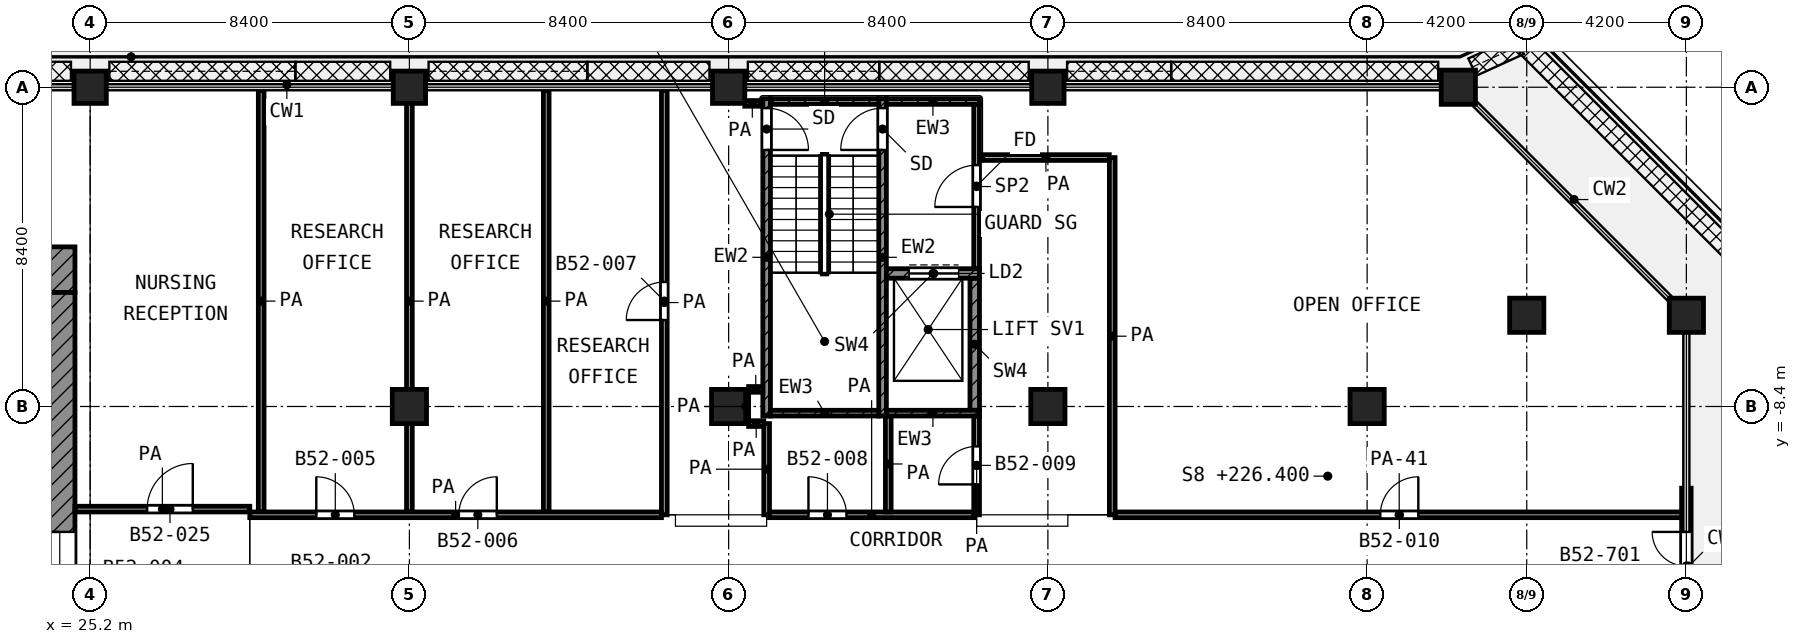
"""IFC4 building model, lengths in metres.
Left out: names, types, materials, properties, quantities, classifications, styles, units other than length and angle.
Written with IfcOpenShell. Run it as: python <this file> out.ifc"""

import sys

from ifc_helpers import new_model, si_unit, direction, frame, frame_2d, origin, origin_2d, place, context, subcontext, project, spatial, rectangle, extrude, element, fill, save


model = new_model("IFC4")
c1 = context("Model", 3, precision=1e-05, world=origin(), true_north=direction((0.0, 1.0)))
c2 = subcontext(c1, "Body", "Model", "MODEL_VIEW")
j1 = project(units=[si_unit("LENGTHUNIT", "METRE"), si_unit("PLANEANGLEUNIT", "RADIAN")], contexts=[c1])
p1 = place(None, origin())
s1 = spatial("IfcSite", under=j1, at=p1, CompositionType="ELEMENT")
p2 = place(p1, origin())
s2 = spatial("IfcBuilding", under=s1, at=p2, CompositionType="ELEMENT")
p3 = place(p2, frame((0.0, 0.0, 226.4)))
s3 = spatial("IfcBuildingStorey", under=s2, at=p3, CompositionType="ELEMENT", Elevation=226.4)
for number, where, z_axis, x_axis in (
    (1, (25.2, 0.0, 0.0), (0.0, 0.0, 1.0), (1.0, 0.0, 0.0)),
    (2, (33.6, 0.0, 0.0), (0.0, 0.0, 1.0), (1.0, 0.0, 0.0)),
    (3, (42.0, 0.0, 0.0), (0.0, 0.0, 1.0), (1.0, 0.0, 0.0)),
    (4, (50.4, 0.0, 0.0), (0.0, 0.0, 1.0), (1.0, 0.0, 0.0)),
):
    element("IfcColumn", number, at=place(p3, frame(where, z_axis=z_axis, x_axis=x_axis)), inside=s3, PredefinedType="COLUMN", context=c2, shape_type="SweptSolid", body=[
        extrude(rectangle(XDim=0.85, YDim=0.85, at=origin_2d()), origin(), (0.0, 0.0, 1.0), 4.2),
    ])
for number, where, z_axis, x_axis in (
    (5, (61.2, 0.0, 0.0), (0.0, 0.0, 1.0), (1.0, 0.0, 0.0)),
    (6, (63.0, -6.0, 0.0), (0.0, 0.0, 1.0), (1.0, 0.0, 0.0)),
    (7, (67.2, -6.0, 0.0), (0.0, 0.0, 1.0), (1.0, 0.0, 0.0)),
    (8, (33.6, -8.4, 0.0), (0.0, 0.0, 1.0), (1.0, 0.0, 0.0)),
    (9, (42.0, -8.4, 0.0), (0.0, 0.0, 1.0), (1.0, 0.0, 0.0)),
    (10, (50.4, -8.4, 0.0), (0.0, 0.0, 1.0), (1.0, 0.0, 0.0)),
    (11, (58.8, -8.4, 0.0), (0.0, 0.0, 1.0), (1.0, 0.0, 0.0)),
):
    element("IfcColumn", number, at=place(p3, frame(where, z_axis=z_axis, x_axis=x_axis)), inside=s3, PredefinedType="COLUMN", context=c2, shape_type="SweptSolid", body=[
        extrude(rectangle(XDim=0.9, YDim=0.9, at=origin_2d()), origin(), (0.0, 0.0, 1.0), 4.2),
    ])
p4 = place(p3, frame((67.2, -14.65, 0.0), z_axis=(0.0, 0.0, 1.0), x_axis=(0.0, 1.0, 0.0)))
e12 = element("IfcWall", 12, at=p4, inside=s3, PredefinedType="SOLIDWALL", context=c2, shape_type="SweptSolid", body=[
    extrude(rectangle(XDim=4.1, YDim=0.25, at=frame_2d((2.05, 0.0))), origin(), (0.0, 0.0, 1.0), 3.48),
])
p5 = place(p4, frame((1.15, 0.0, 0.0)))
e13 = element("IfcOpeningElement", 13, at=p5, cuts=e12, PredefinedType="OPENING", context=c2, shape_type="SweptSolid", body=[
    extrude(rectangle(XDim=1.8, YDim=2.1, at=frame_2d((0.9, 1.05))), frame((0.0, 0.135, 0.0), z_axis=(0.0, -1.0, 0.0), x_axis=(1.0, 0.0, 0.0)), (0.0, 0.0, 1.0), 0.27),
])
p6 = place(p3, frame((4.2, -4.8, 0.0), z_axis=(0.0, 0.0, 1.0), x_axis=(1.0, 0.0, 0.0)))
e14 = element("IfcWall", 14, at=p6, inside=s3, PredefinedType="SHEAR", context=c2, shape_type="SweptSolid", body=[
    extrude(rectangle(XDim=20.6, YDim=1.2, at=frame_2d((10.3, 0.0))), origin(), (0.0, 0.0, 1.0), 3.6),
])
p7 = place(p6, frame((1.95, 0.0, 0.0)))
e15 = element("IfcOpeningElement", 15, at=p7, cuts=e14, PredefinedType="OPENING", context=c2, shape_type="SweptSolid", body=[
    extrude(rectangle(XDim=1.1, YDim=2.1, at=frame_2d((0.55, 1.05))), frame((0.0, 0.61, 0.0), z_axis=(0.0, -1.0, 0.0), x_axis=(1.0, 0.0, 0.0)), (0.0, 0.0, 1.0), 1.22),
])
p8 = place(p6, frame((17.95, 0.0, 0.0)))
e16 = element("IfcOpeningElement", 16, at=p8, cuts=e14, PredefinedType="OPENING", context=c2, shape_type="SweptSolid", body=[
    extrude(rectangle(XDim=1.1, YDim=2.1, at=frame_2d((0.55, 1.05))), frame((0.0, 0.61, 0.0), z_axis=(0.0, -1.0, 0.0), x_axis=(1.0, 0.0, 0.0)), (0.0, 0.0, 1.0), 1.22),
])
p9 = place(p3, frame((24.4, -24.0, 0.0), z_axis=(0.0, 0.0, 1.0), x_axis=(0.0, 1.0, 0.0)))
e17 = element("IfcWall", 17, at=p9, inside=s3, PredefinedType="SHEAR", context=c2, shape_type="SweptSolid", body=[
    extrude(rectangle(XDim=18.6, YDim=0.8, at=frame_2d((9.3, 0.0))), origin(), (0.0, 0.0, 1.0), 3.6),
])
p10 = place(p9, frame((10.5, 0.0, 0.0)))
e18 = element("IfcOpeningElement", 18, at=p10, cuts=e17, PredefinedType="OPENING", context=c2, shape_type="SweptSolid", body=[
    extrude(rectangle(XDim=1.8, YDim=2.1, at=frame_2d((0.9, 1.05))), frame((0.0, 0.41, 0.0), z_axis=(0.0, -1.0, 0.0), x_axis=(1.0, 0.0, 0.0)), (0.0, 0.0, 1.0), 0.82),
])
p11 = place(p3, frame((43.0, -8.65, 0.0), z_axis=(0.0, 0.0, 1.0), x_axis=(0.0, 1.0, 0.0)))
e19 = element("IfcWall", 19, at=p11, inside=s3, PredefinedType="SHEAR", context=c2, shape_type="SweptSolid", body=[
    extrude(rectangle(XDim=8.35, YDim=0.2, at=frame_2d((4.175, 0.0))), origin(), (0.0, 0.0, 1.0), 3.6),
])
p12 = place(p11, frame((7.0, 0.0, 0.0)))
e20 = element("IfcOpeningElement", 20, at=p12, cuts=e19, PredefinedType="OPENING", context=c2, shape_type="SweptSolid", body=[
    extrude(rectangle(XDim=1.1, YDim=2.1, at=frame_2d((0.55, 1.05))), frame((0.0, 0.11, 0.0), z_axis=(0.0, -1.0, 0.0), x_axis=(1.0, 0.0, 0.0)), (0.0, 0.0, 1.0), 0.22),
])
p13 = place(p3, frame((46.05, -8.65, 0.0), z_axis=(0.0, 0.0, 1.0), x_axis=(0.0, 1.0, 0.0)))
e21 = element("IfcWall", 21, at=p13, inside=s3, PredefinedType="SHEAR", context=c2, shape_type="SweptSolid", body=[
    extrude(rectangle(XDim=8.35, YDim=0.2, at=frame_2d((4.175, 0.0))), origin(), (0.0, 0.0, 1.0), 3.6),
])
p14 = place(p13, frame((7.0, 0.0, 0.0)))
e22 = element("IfcOpeningElement", 22, at=p14, cuts=e21, PredefinedType="OPENING", context=c2, shape_type="SweptSolid", body=[
    extrude(rectangle(XDim=1.1, YDim=2.1, at=frame_2d((0.55, 1.05))), frame((0.0, 0.11, 0.0), z_axis=(0.0, -1.0, 0.0), x_axis=(1.0, 0.0, 0.0)), (0.0, 0.0, 1.0), 0.22),
])
p15 = place(p3, frame((43.1, -0.375, 0.0), z_axis=(0.0, 0.0, 1.0), x_axis=(1.0, 0.0, 0.0)))
e23 = element("IfcWall", 23, at=p15, inside=s3, PredefinedType="SHEAR", context=c2, shape_type="SweptSolid", body=[
    extrude(rectangle(XDim=2.85, YDim=0.15, at=frame_2d((1.425, 0.0))), origin(), (0.0, 0.0, 1.0), 3.6),
])
p16 = place(p3, frame((46.15, -0.375, 0.0), z_axis=(0.0, 0.0, 1.0), x_axis=(1.0, 0.0, 0.0)))
e24 = element("IfcWall", 24, at=p16, inside=s3, PredefinedType="SHEAR", context=c2, shape_type="SweptSolid", body=[
    extrude(rectangle(XDim=2.45, YDim=0.15, at=frame_2d((1.225, 0.0))), origin(), (0.0, 0.0, 1.0), 3.6),
])
p17 = place(p3, frame((43.1, -8.575, 0.0), z_axis=(0.0, 0.0, 1.0), x_axis=(1.0, 0.0, 0.0)))
e25 = element("IfcWall", 25, at=p17, inside=s3, PredefinedType="SHEAR", context=c2, shape_type="SweptSolid", body=[
    extrude(rectangle(XDim=2.85, YDim=0.15, at=frame_2d((1.425, 0.0))), origin(), (0.0, 0.0, 1.0), 3.6),
])
p18 = place(p3, frame((46.15, -8.575, 0.0), z_axis=(0.0, 0.0, 1.0), x_axis=(1.0, 0.0, 0.0)))
e26 = element("IfcWall", 26, at=p18, inside=s3, PredefinedType="SHEAR", context=c2, shape_type="SweptSolid", body=[
    extrude(rectangle(XDim=2.45, YDim=0.15, at=frame_2d((1.225, 0.0))), origin(), (0.0, 0.0, 1.0), 3.6),
])
p19 = place(p3, frame((46.15, -4.9, 0.0), z_axis=(0.0, 0.0, 1.0), x_axis=(1.0, 0.0, 0.0)))
e27 = element("IfcWall", 27, at=p19, inside=s3, PredefinedType="SHEAR", context=c2, shape_type="SweptSolid", body=[
    extrude(rectangle(XDim=2.45, YDim=0.25, at=frame_2d((1.225, 0.0))), origin(), (0.0, 0.0, 1.0), 3.6),
])
p20 = place(p19, frame((0.6, 0.0, 0.0)))
e28 = element("IfcOpeningElement", 28, at=p20, cuts=e27, PredefinedType="OPENING", context=c2, shape_type="SweptSolid", body=[
    extrude(rectangle(XDim=1.3, YDim=2.1, at=frame_2d((0.65, 1.05))), frame((0.0, 0.135, 0.0), z_axis=(0.0, -1.0, 0.0), x_axis=(1.0, 0.0, 0.0)), (0.0, 0.0, 1.0), 0.27),
])
p21 = place(p3, frame((48.475, -8.5, 0.0), z_axis=(0.0, 0.0, 1.0), x_axis=(0.0, 1.0, 0.0)))
e29 = element("IfcWall", 29, at=p21, inside=s3, PredefinedType="SHEAR", context=c2, shape_type="SweptSolid", body=[
    extrude(rectangle(XDim=3.475, YDim=0.25, at=frame_2d((1.738, 0.0))), origin(), (0.0, 0.0, 1.0), 3.6),
])
p22 = place(p3, frame((48.525, -4.775, 0.0), z_axis=(0.0, 0.0, 1.0), x_axis=(0.0, 1.0, 0.0)))
e30 = element("IfcWall", 30, at=p22, inside=s3, PredefinedType="PARTITIONING", context=c2, shape_type="SweptSolid", body=[
    extrude(rectangle(XDim=4.325, YDim=0.15, at=frame_2d((2.163, 0.0))), origin(), (0.0, 0.0, 1.0), 3.6),
])
p23 = place(p22, frame((1.625, 0.0, 0.0)))
e31 = element("IfcOpeningElement", 31, at=p23, cuts=e30, PredefinedType="OPENING", context=c2, shape_type="SweptSolid", body=[
    extrude(rectangle(XDim=1.1, YDim=2.1, at=frame_2d((0.55, 1.05))), frame((0.0, 0.085, 0.0), z_axis=(0.0, -1.0, 0.0), x_axis=(1.0, 0.0, 0.0)), (0.0, 0.0, 1.0), 0.17),
])
p24 = place(p3, frame((29.4, -11.25, 0.0), z_axis=(0.0, 0.0, 1.0), x_axis=(1.0, 0.0, 0.0)))
e32 = element("IfcWall", 32, at=p24, inside=s3, PredefinedType="PARTITIONING", context=c2, shape_type="SweptSolid", body=[
    extrude(rectangle(XDim=10.832, YDim=0.15, at=frame_2d((5.416, 0.0))), origin(), (0.0, 0.0, 1.0), 3.6),
])
p25 = place(p24, frame((1.75, 0.0, 0.0)))
e33 = element("IfcOpeningElement", 33, at=p25, cuts=e32, PredefinedType="OPENING", context=c2, shape_type="SweptSolid", body=[
    extrude(rectangle(XDim=1.0, YDim=2.1, at=frame_2d((0.5, 1.05))), frame((0.0, 0.085, 0.0), z_axis=(0.0, -1.0, 0.0), x_axis=(1.0, 0.0, 0.0)), (0.0, 0.0, 1.0), 0.17),
])
p26 = place(p24, frame((5.5, 0.0, 0.0)))
e34 = element("IfcOpeningElement", 34, at=p26, cuts=e32, PredefinedType="OPENING", context=c2, shape_type="SweptSolid", body=[
    extrude(rectangle(XDim=1.0, YDim=2.1, at=frame_2d((0.5, 1.05))), frame((0.0, 0.085, 0.0), z_axis=(0.0, -1.0, 0.0), x_axis=(1.0, 0.0, 0.0)), (0.0, 0.0, 1.0), 0.17),
])
p27 = place(p3, frame((43.075, -11.25, 0.0), z_axis=(0.0, 0.0, 1.0), x_axis=(1.0, 0.0, 0.0)))
e35 = element("IfcWall", 35, at=p27, inside=s3, PredefinedType="PARTITIONING", context=c2, shape_type="SweptSolid", body=[
    extrude(rectangle(XDim=5.375, YDim=0.15, at=frame_2d((2.688, 0.0))), origin(), (0.0, 0.0, 1.0), 3.6),
])
p28 = place(p27, frame((1.025, 0.0, 0.0)))
e36 = element("IfcOpeningElement", 36, at=p28, cuts=e35, PredefinedType="OPENING", context=c2, shape_type="SweptSolid", body=[
    extrude(rectangle(XDim=1.0, YDim=2.1, at=frame_2d((0.5, 1.05))), frame((0.0, 0.085, 0.0), z_axis=(0.0, -1.0, 0.0), x_axis=(1.0, 0.0, 0.0)), (0.0, 0.0, 1.0), 0.17),
])
p29 = place(p3, frame((52.168, -11.25, 0.0), z_axis=(0.0, 0.0, 1.0), x_axis=(1.0, 0.0, 0.0)))
e37 = element("IfcWall", 37, at=p29, inside=s3, PredefinedType="PARTITIONING", context=c2, shape_type="SweptSolid", body=[
    extrude(rectangle(XDim=14.952, YDim=0.15, at=frame_2d((7.476, 0.0))), origin(), (0.0, 0.0, 1.0), 2.7),
])
p30 = place(p29, frame((6.979, 0.0, 0.0)))
e38 = element("IfcOpeningElement", 38, at=p30, cuts=e37, PredefinedType="OPENING", context=c2, shape_type="SweptSolid", body=[
    extrude(rectangle(XDim=1.0, YDim=2.1, at=frame_2d((0.5, 1.05))), frame((0.0, 0.085, 0.0), z_axis=(0.0, -1.0, 0.0), x_axis=(1.0, 0.0, 0.0)), (0.0, 0.0, 1.0), 0.17),
])
p31 = place(p3, frame((24.8, -11.1, 0.0), z_axis=(0.0, 0.0, 1.0), x_axis=(1.0, 0.0, 0.0)))
e39 = element("IfcWall", 39, at=p31, inside=s3, PredefinedType="PARTITIONING", context=c2, shape_type="SweptSolid", body=[
    extrude(rectangle(XDim=4.6, YDim=0.15, at=frame_2d((2.3, 0.0))), origin(), (0.0, 0.0, 1.0), 3.6),
])
p32 = place(p31, frame((1.9, 0.0, 0.0)))
e40 = element("IfcOpeningElement", 40, at=p32, cuts=e39, PredefinedType="OPENING", context=c2, shape_type="SweptSolid", body=[
    extrude(rectangle(XDim=1.2, YDim=2.1, at=frame_2d((0.6, 1.05))), frame((0.0, 0.085, 0.0), z_axis=(0.0, -1.0, 0.0), x_axis=(1.0, 0.0, 0.0)), (0.0, 0.0, 1.0), 0.17),
])
p33 = place(p3, frame((42.525, -8.85, 0.0), z_axis=(0.0, 0.0, 1.0), x_axis=(1.0, 0.0, 0.0)))
e41 = element("IfcWall", 41, at=p33, inside=s3, PredefinedType="PARTITIONING", context=c2, shape_type="SweptSolid", body=[
    extrude(rectangle(XDim=0.4, YDim=0.15, at=frame_2d((0.2, 0.0))), origin(), (0.0, 0.0, 1.0), 3.6),
])
p34 = place(p3, frame((42.526, -7.95, 0.0), z_axis=(0.0, 0.0, 1.0), x_axis=(1.0, 0.0, 0.0)))
e42 = element("IfcWall", 42, at=p34, inside=s3, PredefinedType="PARTITIONING", context=c2, shape_type="SweptSolid", body=[
    extrude(rectangle(XDim=0.374, YDim=0.15, at=frame_2d((0.187, 0.0))), origin(), (0.0, 0.0, 1.0), 3.6),
])
p35 = place(p3, frame((48.68, -1.85, 0.0), z_axis=(0.0, 0.0, 1.0), x_axis=(1.0, 0.0, 0.0)))
e43 = element("IfcWall", 43, at=p35, inside=s3, PredefinedType="PARTITIONING", context=c2, shape_type="SweptSolid", body=[
    extrude(rectangle(XDim=3.336, YDim=0.15, at=frame_2d((1.668, 0.0))), origin(), (0.0, 0.0, 1.0), 3.6),
])
p36 = place(p3, frame((42.425, -0.425, 0.0), z_axis=(0.0, 0.0, 1.0), x_axis=(1.0, 0.0, 0.0)))
e44 = element("IfcWall", 44, at=p36, inside=s3, PredefinedType="PARTITIONING", context=c2, shape_type="SweptSolid", body=[
    extrude(rectangle(XDim=0.395, YDim=0.15, at=frame_2d((0.198, 0.0))), origin(), (0.0, 0.0, 1.0), 3.6),
])
for number, where, z_axis, x_axis in (
    (45, (29.7, -11.175, 0.0), (0.0, 0.0, 1.0), (0.0, 1.0, 0.0)),
    (46, (33.6, -11.175, 0.0), (0.0, 0.0, 1.0), (0.0, 1.0, 0.0)),
    (47, (37.2, -11.175, 0.0), (0.0, 0.0, 1.0), (0.0, 1.0, 0.0)),
):
    element("IfcWall", number, at=place(p3, frame(where, z_axis=z_axis, x_axis=x_axis)), inside=s3, PredefinedType="PARTITIONING", context=c2, shape_type="SweptSolid", body=[
        extrude(rectangle(XDim=11.095, YDim=0.15, at=frame_2d((5.547, 0.0))), origin(), (0.0, 0.0, 1.0), 3.6),
    ])
p37 = place(p3, frame((40.307, -11.25, 0.0), z_axis=(0.0, 0.0, 1.0), x_axis=(0.0, 1.0, 0.0)))
e48 = element("IfcWall", 48, at=p37, inside=s3, PredefinedType="PARTITIONING", context=c2, shape_type="SweptSolid", body=[
    extrude(rectangle(XDim=11.17, YDim=0.15, at=frame_2d((5.585, 0.0))), origin(), (0.0, 0.0, 1.0), 3.6),
])
p38 = place(p37, frame((5.125, 0.0, 0.0)))
e49 = element("IfcOpeningElement", 49, at=p38, cuts=e48, PredefinedType="OPENING", context=c2, shape_type="SweptSolid", body=[
    extrude(rectangle(XDim=1.0, YDim=2.1, at=frame_2d((0.5, 1.05))), frame((0.0, 0.085, 0.0), z_axis=(0.0, -1.0, 0.0), x_axis=(1.0, 0.0, 0.0)), (0.0, 0.0, 1.0), 0.17),
])
p39 = place(p3, frame((42.45, -8.85, 0.0), z_axis=(0.0, 0.0, 1.0), x_axis=(0.0, 1.0, 0.0)))
e50 = element("IfcWall", 50, at=p39, inside=s3, PredefinedType="PARTITIONING", context=c2, shape_type="SweptSolid", body=[
    extrude(rectangle(XDim=0.899, YDim=0.15, at=frame_2d((0.45, 0.0))), origin(), (0.0, 0.0, 1.0), 3.6),
])
p40 = place(p3, frame((43.0, -11.25, 0.0), z_axis=(0.0, 0.0, 1.0), x_axis=(0.0, 1.0, 0.0)))
e51 = element("IfcWall", 51, at=p40, inside=s3, PredefinedType="PARTITIONING", context=c2, shape_type="SweptSolid", body=[
    extrude(rectangle(XDim=2.4, YDim=0.15, at=frame_2d((1.2, 0.0))), origin(), (0.0, 0.0, 1.0), 3.6),
])
p41 = place(p3, frame((46.2, -11.175, 0.0), z_axis=(0.0, 0.0, 1.0), x_axis=(0.0, 1.0, 0.0)))
e52 = element("IfcWall", 52, at=p41, inside=s3, PredefinedType="PARTITIONING", context=c2, shape_type="SweptSolid", body=[
    extrude(rectangle(XDim=2.525, YDim=0.15, at=frame_2d((1.263, 0.0))), origin(), (0.0, 0.0, 1.0), 3.6),
])
p42 = place(p3, frame((48.525, -11.25, 0.0), z_axis=(0.0, 0.0, 1.0), x_axis=(0.0, 1.0, 0.0)))
e53 = element("IfcWall", 53, at=p42, inside=s3, PredefinedType="PARTITIONING", context=c2, shape_type="SweptSolid", body=[
    extrude(rectangle(XDim=2.6, YDim=0.15, at=frame_2d((1.3, 0.0))), origin(), (0.0, 0.0, 1.0), 3.6),
])
p43 = place(p42, frame((0.8, 0.0, 0.0)))
e54 = element("IfcOpeningElement", 54, at=p43, cuts=e53, PredefinedType="OPENING", context=c2, shape_type="SweptSolid", body=[
    extrude(rectangle(XDim=1.0, YDim=2.1, at=frame_2d((0.5, 1.05))), frame((0.0, 0.085, 0.0), z_axis=(0.0, -1.0, 0.0), x_axis=(1.0, 0.0, 0.0)), (0.0, 0.0, 1.0), 0.17),
])
p44 = place(p3, frame((52.093, -11.25, 0.0), z_axis=(0.0, 0.0, 1.0), x_axis=(0.0, 1.0, 0.0)))
e55 = element("IfcWall", 55, at=p44, inside=s3, PredefinedType="PARTITIONING", context=c2, shape_type="SweptSolid", body=[
    extrude(rectangle(XDim=9.399, YDim=0.15, at=frame_2d((4.699, 0.0))), origin(), (0.0, 0.0, 1.0), 3.6),
])
p45 = place(p5, origin())
e56 = element("IfcDoor", 56, at=p45, inside=s3, OperationType="DOUBLE_DOOR_SINGLE_SWING", PredefinedType="DOOR", context=c2, shape_type="SweptSolid", body=[
    extrude(rectangle(XDim=1.8, YDim=2.1, at=frame_2d((0.9, 1.05))), frame((0.0, 0.025, 0.0), z_axis=(0.0, -1.0, 0.0), x_axis=(1.0, 0.0, 0.0)), (0.0, 0.0, 1.0), 0.05),
])
fill(e13, e56)
p46 = place(p10, origin())
e57 = element("IfcDoor", 57, at=p46, inside=s3, OperationType="DOUBLE_DOOR_SINGLE_SWING", PredefinedType="DOOR", context=c2, shape_type="SweptSolid", body=[
    extrude(rectangle(XDim=1.8, YDim=2.1, at=frame_2d((0.9, 1.05))), frame((0.0, 0.025, 0.0), z_axis=(0.0, -1.0, 0.0), x_axis=(1.0, 0.0, 0.0)), (0.0, 0.0, 1.0), 0.05),
])
fill(e18, e57)
p47 = place(p12, frame((1.1, 0.0, 0.0), z_axis=(0.0, 0.0, 1.0), x_axis=(-1.0, 0.0, 0.0)))
e58 = element("IfcDoor", 58, at=p47, inside=s3, OperationType="SINGLE_SWING_LEFT", PredefinedType="DOOR", context=c2, shape_type="SweptSolid", body=[
    extrude(rectangle(XDim=1.1, YDim=2.1, at=frame_2d((0.55, 1.05))), frame((0.0, 0.025, 0.0), z_axis=(0.0, -1.0, 0.0), x_axis=(1.0, 0.0, 0.0)), (0.0, 0.0, 1.0), 0.05),
])
fill(e20, e58)
p48 = place(p14, origin())
e59 = element("IfcDoor", 59, at=p48, inside=s3, OperationType="SINGLE_SWING_LEFT", PredefinedType="DOOR", context=c2, shape_type="SweptSolid", body=[
    extrude(rectangle(XDim=1.1, YDim=2.1, at=frame_2d((0.55, 1.05))), frame((0.0, 0.025, 0.0), z_axis=(0.0, -1.0, 0.0), x_axis=(1.0, 0.0, 0.0)), (0.0, 0.0, 1.0), 0.05),
])
fill(e22, e59)
p49 = place(p20, origin())
e60 = element("IfcDoor", 60, at=p49, inside=s3, OperationType="DOUBLE_DOOR_SLIDING", PredefinedType="DOOR", context=c2, shape_type="SweptSolid", body=[
    extrude(rectangle(XDim=1.3, YDim=2.1, at=frame_2d((0.65, 1.05))), frame((0.0, 0.025, 0.0), z_axis=(0.0, -1.0, 0.0), x_axis=(1.0, 0.0, 0.0)), (0.0, 0.0, 1.0), 0.05),
])
fill(e28, e60)
p50 = place(p23, origin())
e61 = element("IfcDoor", 61, at=p50, inside=s3, OperationType="SINGLE_SWING_LEFT", PredefinedType="DOOR", context=c2, shape_type="SweptSolid", body=[
    extrude(rectangle(XDim=1.1, YDim=2.1, at=frame_2d((0.55, 1.05))), frame((0.0, 0.025, 0.0), z_axis=(0.0, -1.0, 0.0), x_axis=(1.0, 0.0, 0.0)), (0.0, 0.0, 1.0), 0.05),
])
fill(e31, e61)
p51 = place(p32, origin())
e62 = element("IfcDoor", 62, at=p51, inside=s3, OperationType="SINGLE_SWING_RIGHT", PredefinedType="DOOR", context=c2, shape_type="SweptSolid", body=[
    extrude(rectangle(XDim=1.2, YDim=2.1, at=frame_2d((0.6, 1.05))), frame((0.0, 0.025, 0.0), z_axis=(0.0, -1.0, 0.0), x_axis=(1.0, 0.0, 0.0)), (0.0, 0.0, 1.0), 0.05),
])
fill(e40, e62)
p52 = place(p25, origin())
e63 = element("IfcDoor", 63, at=p52, inside=s3, OperationType="SINGLE_SWING_LEFT", PredefinedType="DOOR", context=c2, shape_type="SweptSolid", body=[
    extrude(rectangle(XDim=1.0, YDim=2.1, at=frame_2d((0.5, 1.05))), frame((0.0, 0.025, 0.0), z_axis=(0.0, -1.0, 0.0), x_axis=(1.0, 0.0, 0.0)), (0.0, 0.0, 1.0), 0.05),
])
fill(e33, e63)
p53 = place(p26, origin())
e64 = element("IfcDoor", 64, at=p53, inside=s3, OperationType="SINGLE_SWING_RIGHT", PredefinedType="DOOR", context=c2, shape_type="SweptSolid", body=[
    extrude(rectangle(XDim=1.0, YDim=2.1, at=frame_2d((0.5, 1.05))), frame((0.0, 0.025, 0.0), z_axis=(0.0, -1.0, 0.0), x_axis=(1.0, 0.0, 0.0)), (0.0, 0.0, 1.0), 0.05),
])
fill(e34, e64)
p54 = place(p38, origin())
e65 = element("IfcDoor", 65, at=p54, inside=s3, OperationType="SINGLE_SWING_LEFT", PredefinedType="DOOR", context=c2, shape_type="SweptSolid", body=[
    extrude(rectangle(XDim=1.0, YDim=2.1, at=frame_2d((0.5, 1.05))), frame((0.0, 0.025, 0.0), z_axis=(0.0, -1.0, 0.0), x_axis=(1.0, 0.0, 0.0)), (0.0, 0.0, 1.0), 0.05),
])
fill(e49, e65)
p55 = place(p28, origin())
e66 = element("IfcDoor", 66, at=p55, inside=s3, OperationType="SINGLE_SWING_LEFT", PredefinedType="DOOR", context=c2, shape_type="SweptSolid", body=[
    extrude(rectangle(XDim=1.0, YDim=2.1, at=frame_2d((0.5, 1.05))), frame((0.0, 0.025, 0.0), z_axis=(0.0, -1.0, 0.0), x_axis=(1.0, 0.0, 0.0)), (0.0, 0.0, 1.0), 0.05),
])
fill(e36, e66)
p56 = place(p43, origin())
e67 = element("IfcDoor", 67, at=p56, inside=s3, OperationType="SINGLE_SWING_LEFT", PredefinedType="DOOR", context=c2, shape_type="SweptSolid", body=[
    extrude(rectangle(XDim=1.0, YDim=2.1, at=frame_2d((0.5, 1.05))), frame((0.0, 0.025, 0.0), z_axis=(0.0, -1.0, 0.0), x_axis=(1.0, 0.0, 0.0)), (0.0, 0.0, 1.0), 0.05),
])
fill(e54, e67)
p57 = place(p30, origin())
e68 = element("IfcDoor", 68, at=p57, inside=s3, OperationType="SINGLE_SWING_RIGHT", PredefinedType="DOOR", context=c2, shape_type="SweptSolid", body=[
    extrude(rectangle(XDim=1.0, YDim=2.1, at=frame_2d((0.5, 1.05))), frame((0.0, 0.025, 0.0), z_axis=(0.0, -1.0, 0.0), x_axis=(1.0, 0.0, 0.0)), (0.0, 0.0, 1.0), 0.05),
])
fill(e38, e68)
save(model, sys.argv[1])
